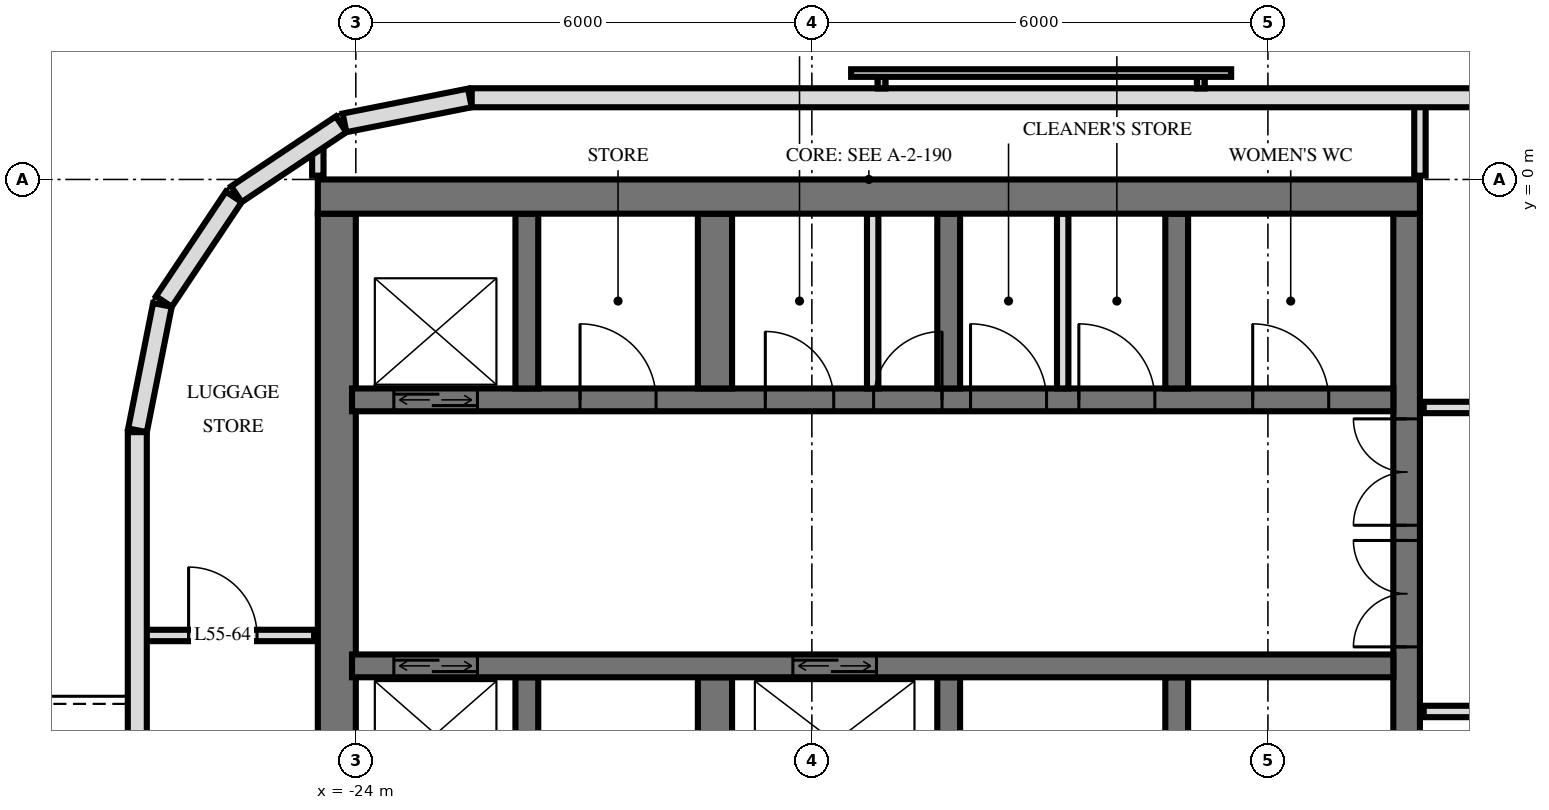
"""IFC4 building model, lengths in metres.
Left out: names, types, materials, properties, quantities, classifications, styles, units other than length and angle.
Written with IfcOpenShell. Run it as: python <this file> out.ifc"""

import sys

from ifc_helpers import new_model, si_unit, direction, frame, frame_2d, origin, place, context, subcontext, project, spatial, rectangle, extrude, element, fill, save


model = new_model("IFC4")
c1 = context("Model", 3, precision=1e-05, world=origin(), true_north=direction((0.0, 1.0)))
c2 = subcontext(c1, "Body", "Model", "MODEL_VIEW")
j1 = project(units=[si_unit("LENGTHUNIT", "METRE"), si_unit("PLANEANGLEUNIT", "RADIAN")], contexts=[c1])
p1 = place(None, origin())
s1 = spatial("IfcSite", under=j1, at=p1, CompositionType="ELEMENT")
p2 = place(p1, origin())
s2 = spatial("IfcBuilding", under=s1, at=p2, CompositionType="ELEMENT")
p3 = place(p2, frame((0.0, 0.0, 211.6)))
s3 = spatial("IfcBuildingStorey", under=s2, at=p3, CompositionType="ELEMENT", Elevation=211.6)
p4 = place(p3, frame((-24.5, -0.225, 0.0), z_axis=(0.0, 0.0, 1.0), x_axis=(1.0, 0.0, 0.0)))
e1 = element("IfcWall", 1, at=p4, inside=s3, PredefinedType="SHEAR", context=c2, shape_type="SweptSolid", body=[
    extrude(rectangle(XDim=14.5, YDim=0.45, at=frame_2d((7.25, 0.0))), origin(), (0.0, 0.0, 1.0), 3.5),
])
p5 = place(p3, frame((-10.175, -14.55, 0.0), z_axis=(0.0, 0.0, 1.0), x_axis=(0.0, 1.0, 0.0)))
e2 = element("IfcWall", 2, at=p5, inside=s3, PredefinedType="SHEAR", context=c2, shape_type="SweptSolid", body=[
    extrude(rectangle(XDim=14.1, YDim=0.35, at=frame_2d((7.05, 0.0))), origin(), (0.0, 0.0, 1.0), 3.5),
])
p6 = place(p5, frame((8.4, 0.0, 0.0)))
e3 = element("IfcOpeningElement", 3, at=p6, cuts=e2, PredefinedType="OPENING", context=c2, shape_type="SweptSolid", body=[
    extrude(rectangle(XDim=1.4, YDim=2.4, at=frame_2d((0.7, 1.2))), frame((0.0, 0.185, 0.0), z_axis=(0.0, -1.0, 0.0), x_axis=(1.0, 0.0, 0.0)), (0.0, 0.0, 1.0), 0.37),
])
p7 = place(p5, frame((10.0, 0.0, 0.0)))
e4 = element("IfcOpeningElement", 4, at=p7, cuts=e2, PredefinedType="OPENING", context=c2, shape_type="SweptSolid", body=[
    extrude(rectangle(XDim=1.4, YDim=2.4, at=frame_2d((0.7, 1.2))), frame((0.0, 0.185, 0.0), z_axis=(0.0, -1.0, 0.0), x_axis=(1.0, 0.0, 0.0)), (0.0, 0.0, 1.0), 0.37),
])
p8 = place(p5, frame((4.0, 0.0, 0.0)))
e5 = element("IfcOpeningElement", 5, at=p8, cuts=e2, PredefinedType="OPENING", context=c2, shape_type="SweptSolid", body=[
    extrude(rectangle(XDim=1.2, YDim=2.1, at=frame_2d((0.6, 1.05))), frame((0.0, 0.185, 0.0), z_axis=(0.0, -1.0, 0.0), x_axis=(1.0, 0.0, 0.0)), (0.0, 0.0, 1.0), 0.37),
])
p9 = place(p3, frame((-24.25, -14.55, 0.0), z_axis=(0.0, 0.0, 1.0), x_axis=(0.0, 1.0, 0.0)))
e6 = element("IfcWall", 6, at=p9, inside=s3, PredefinedType="SHEAR", context=c2, shape_type="SweptSolid", body=[
    extrude(rectangle(XDim=14.1, YDim=0.5, at=frame_2d((7.05, 0.0))), origin(), (0.0, 0.0, 1.0), 3.5),
])
p10 = place(p3, frame((-24.05, -2.9, 0.0), z_axis=(0.0, 0.0, 1.0), x_axis=(1.0, 0.0, 0.0)))
e7 = element("IfcWall", 7, at=p10, inside=s3, PredefinedType="SHEAR", context=c2, shape_type="SweptSolid", body=[
    extrude(rectangle(XDim=13.7, YDim=0.3, at=frame_2d((6.85, 0.0))), origin(), (0.0, 0.0, 1.0), 3.5),
])
p11 = place(p10, frame((0.55, 0.0, 0.0)))
e8 = element("IfcOpeningElement", 8, at=p11, cuts=e7, PredefinedType="OPENING", context=c2, shape_type="SweptSolid", body=[
    extrude(rectangle(XDim=1.1, YDim=2.1, at=frame_2d((0.55, 1.05))), frame((0.0, 0.16, 0.0), z_axis=(0.0, -1.0, 0.0), x_axis=(1.0, 0.0, 0.0)), (0.0, 0.0, 1.0), 0.32),
])
p12 = place(p10, frame((6.863, 0.0, 0.0)))
e9 = element("IfcOpeningElement", 9, at=p12, cuts=e7, PredefinedType="OPENING", context=c2, shape_type="SweptSolid", body=[
    extrude(rectangle(XDim=0.9, YDim=2.1, at=frame_2d((0.45, 1.05))), frame((0.0, 0.16, 0.0), z_axis=(0.0, -1.0, 0.0), x_axis=(1.0, 0.0, 0.0)), (0.0, 0.0, 1.0), 0.32),
])
p13 = place(p10, frame((5.438, 0.0, 0.0)))
e10 = element("IfcOpeningElement", 10, at=p13, cuts=e7, PredefinedType="OPENING", context=c2, shape_type="SweptSolid", body=[
    extrude(rectangle(XDim=0.9, YDim=2.1, at=frame_2d((0.45, 1.05))), frame((0.0, 0.16, 0.0), z_axis=(0.0, -1.0, 0.0), x_axis=(1.0, 0.0, 0.0)), (0.0, 0.0, 1.0), 0.32),
])
p14 = place(p10, frame((11.85, 0.0, 0.0)))
e11 = element("IfcOpeningElement", 11, at=p14, cuts=e7, PredefinedType="OPENING", context=c2, shape_type="SweptSolid", body=[
    extrude(rectangle(XDim=1.0, YDim=2.1, at=frame_2d((0.5, 1.05))), frame((0.0, 0.16, 0.0), z_axis=(0.0, -1.0, 0.0), x_axis=(1.0, 0.0, 0.0)), (0.0, 0.0, 1.0), 0.32),
])
p15 = place(p10, frame((9.562, 0.0, 0.0)))
e12 = element("IfcOpeningElement", 12, at=p15, cuts=e7, PredefinedType="OPENING", context=c2, shape_type="SweptSolid", body=[
    extrude(rectangle(XDim=1.0, YDim=2.1, at=frame_2d((0.5, 1.05))), frame((0.0, 0.16, 0.0), z_axis=(0.0, -1.0, 0.0), x_axis=(1.0, 0.0, 0.0)), (0.0, 0.0, 1.0), 0.32),
])
p16 = place(p10, frame((8.137, 0.0, 0.0)))
e13 = element("IfcOpeningElement", 13, at=p16, cuts=e7, PredefinedType="OPENING", context=c2, shape_type="SweptSolid", body=[
    extrude(rectangle(XDim=1.0, YDim=2.1, at=frame_2d((0.5, 1.05))), frame((0.0, 0.16, 0.0), z_axis=(0.0, -1.0, 0.0), x_axis=(1.0, 0.0, 0.0)), (0.0, 0.0, 1.0), 0.32),
])
p17 = place(p10, frame((3.0, 0.0, 0.0)))
e14 = element("IfcOpeningElement", 14, at=p17, cuts=e7, PredefinedType="OPENING", context=c2, shape_type="SweptSolid", body=[
    extrude(rectangle(XDim=1.0, YDim=2.1, at=frame_2d((0.5, 1.05))), frame((0.0, 0.16, 0.0), z_axis=(0.0, -1.0, 0.0), x_axis=(1.0, 0.0, 0.0)), (0.0, 0.0, 1.0), 0.32),
])
p18 = place(p3, frame((-24.05, -6.4, 0.0), z_axis=(0.0, 0.0, 1.0), x_axis=(1.0, 0.0, 0.0)))
e15 = element("IfcWall", 15, at=p18, inside=s3, PredefinedType="SHEAR", context=c2, shape_type="SweptSolid", body=[
    extrude(rectangle(XDim=13.7, YDim=0.3, at=frame_2d((6.85, 0.0))), origin(), (0.0, 0.0, 1.0), 3.5),
])
p19 = place(p18, frame((0.55, 0.0, 0.0)))
e16 = element("IfcOpeningElement", 16, at=p19, cuts=e15, PredefinedType="OPENING", context=c2, shape_type="SweptSolid", body=[
    extrude(rectangle(XDim=1.1, YDim=2.1, at=frame_2d((0.55, 1.05))), frame((0.0, 0.16, 0.0), z_axis=(0.0, -1.0, 0.0), x_axis=(1.0, 0.0, 0.0)), (0.0, 0.0, 1.0), 0.32),
])
p20 = place(p18, frame((5.8, 0.0, 0.0)))
e17 = element("IfcOpeningElement", 17, at=p20, cuts=e15, PredefinedType="OPENING", context=c2, shape_type="SweptSolid", body=[
    extrude(rectangle(XDim=1.1, YDim=2.1, at=frame_2d((0.55, 1.05))), frame((0.0, 0.16, 0.0), z_axis=(0.0, -1.0, 0.0), x_axis=(1.0, 0.0, 0.0)), (0.0, 0.0, 1.0), 0.32),
])
for number, where, z_axis, x_axis in (
    (18, (-13.2, -2.75, 0.0), (0.0, 0.0, 1.0), (0.0, 1.0, 0.0)),
    (19, (-13.2, -8.85, 0.0), (0.0, 0.0, 1.0), (0.0, 1.0, 0.0)),
    (20, (-16.2, -2.75, 0.0), (0.0, 0.0, 1.0), (0.0, 1.0, 0.0)),
    (21, (-16.2, -8.85, 0.0), (0.0, 0.0, 1.0), (0.0, 1.0, 0.0)),
):
    element("IfcWall", number, at=place(p3, frame(where, z_axis=z_axis, x_axis=x_axis)), inside=s3, PredefinedType="SHEAR", context=c2, shape_type="SweptSolid", body=[
        extrude(rectangle(XDim=2.3, YDim=0.3, at=frame_2d((1.15, 0.0))), origin(), (0.0, 0.0, 1.0), 3.5),
    ])
for number, where, z_axis, x_axis in (
    (22, (-19.275, -2.75, 0.0), (0.0, 0.0, 1.0), (0.0, 1.0, 0.0)),
    (23, (-19.275, -8.85, 0.0), (0.0, 0.0, 1.0), (0.0, 1.0, 0.0)),
):
    element("IfcWall", number, at=place(p3, frame(where, z_axis=z_axis, x_axis=x_axis)), inside=s3, PredefinedType="SHEAR", context=c2, shape_type="SweptSolid", body=[
        extrude(rectangle(XDim=2.3, YDim=0.45, at=frame_2d((1.15, 0.0))), origin(), (0.0, 0.0, 1.0), 3.5),
    ])
for number, where, z_axis, x_axis in (
    (24, (-21.75, -2.75, 0.0), (0.0, 0.0, 1.0), (0.0, 1.0, 0.0)),
    (25, (-21.75, -8.85, 0.0), (0.0, 0.0, 1.0), (0.0, 1.0, 0.0)),
):
    element("IfcWall", number, at=place(p3, frame(where, z_axis=z_axis, x_axis=x_axis)), inside=s3, PredefinedType="SHEAR", context=c2, shape_type="SweptSolid", body=[
        extrude(rectangle(XDim=2.3, YDim=0.3, at=frame_2d((1.15, 0.0))), origin(), (0.0, 0.0, 1.0), 3.5),
    ])
p21 = place(p3, frame((22.475, 1.075, 0.0), z_axis=(0.0, 0.0, 1.0), x_axis=(-1.0, 0.0, 0.0)))
e26 = element("IfcWall", 26, at=p21, inside=s3, PredefinedType="SOLIDWALL", context=c2, shape_type="SweptSolid", body=[
    extrude(rectangle(XDim=44.951, YDim=0.25, at=frame_2d((22.475, 0.0))), origin(), (0.0, 0.0, 1.0), 3.22),
])
p22 = place(p21, frame((18.275, 0.0, 0.9)))
e27 = element("IfcOpeningElement", 27, at=p22, cuts=e26, PredefinedType="OPENING", context=c2, shape_type="SweptSolid", body=[
    extrude(rectangle(XDim=2.4, YDim=1.5, at=frame_2d((1.2, 0.75))), frame((0.0, 0.135, 0.0), z_axis=(0.0, -1.0, 0.0), x_axis=(1.0, 0.0, 0.0)), (0.0, 0.0, 1.0), 0.27),
])
p23 = place(p21, frame((24.275, 0.0, 0.9)))
e28 = element("IfcOpeningElement", 28, at=p23, cuts=e26, PredefinedType="OPENING", context=c2, shape_type="SweptSolid", body=[
    extrude(rectangle(XDim=2.4, YDim=1.5, at=frame_2d((1.2, 0.75))), frame((0.0, 0.135, 0.0), z_axis=(0.0, -1.0, 0.0), x_axis=(1.0, 0.0, 0.0)), (0.0, 0.0, 1.0), 0.27),
])
p24 = place(p21, frame((27.275, 0.0, 0.9)))
e29 = element("IfcOpeningElement", 29, at=p24, cuts=e26, PredefinedType="OPENING", context=c2, shape_type="SweptSolid", body=[
    extrude(rectangle(XDim=2.4, YDim=1.5, at=frame_2d((1.2, 0.75))), frame((0.0, 0.135, 0.0), z_axis=(0.0, -1.0, 0.0), x_axis=(1.0, 0.0, 0.0)), (0.0, 0.0, 1.0), 0.27),
])
p25 = place(p3, frame((-22.5, 1.073, 0.0), z_axis=(0.0, 0.0, 1.0), x_axis=(-0.980803419081, -0.194999110559, 0.0)))
e30 = element("IfcWall", 30, at=p25, inside=s3, PredefinedType="SOLIDWALL", context=c2, shape_type="SweptSolid", body=[
    extrude(rectangle(XDim=1.681, YDim=0.25, at=frame_2d((0.841, 0.0))), origin(), (0.0, 0.0, 1.0), 3.22),
])
for number, where, z_axis, x_axis in (
    (31, (-24.194, 0.726, 0.0), (0.0, 0.0, 1.0), (-0.831, -0.556, 0.0)),
    (32, (-25.606, -0.229, 0.0), (0.0, 0.0, 1.0), (-0.556, -0.831, 0.0)),
):
    element("IfcWall", number, at=place(p3, frame(where, z_axis=z_axis, x_axis=x_axis)), inside=s3, PredefinedType="SOLIDWALL", context=c2, shape_type="SweptSolid", body=[
        extrude(rectangle(XDim=1.656, YDim=0.25, at=frame_2d((0.828, 0.0))), origin(), (0.0, 0.0, 1.0), 3.22),
    ])
p26 = place(p3, frame((-26.545, -1.651, 0.0), z_axis=(0.0, 0.0, 1.0), x_axis=(-0.194999110559, -0.980803419081, 0.0)))
e33 = element("IfcWall", 33, at=p26, inside=s3, PredefinedType="SOLIDWALL", context=c2, shape_type="SweptSolid", body=[
    extrude(rectangle(XDim=1.681, YDim=0.25, at=frame_2d((0.841, 0.0))), origin(), (0.0, 0.0, 1.0), 3.22),
])
p27 = place(p3, frame((-26.875, -3.325, 0.0), z_axis=(0.0, 0.0, 1.0), x_axis=(0.0, -1.0, 0.0)))
e34 = element("IfcWall", 34, at=p27, inside=s3, PredefinedType="SOLIDWALL", context=c2, shape_type="SweptSolid", body=[
    extrude(rectangle(XDim=21.551, YDim=0.25, at=frame_2d((10.775, 0.0))), origin(), (0.0, 0.0, 1.0), 3.22),
])
p28 = place(p27, frame((6.65, 0.0, 0.0)))
e35 = element("IfcOpeningElement", 35, at=p28, cuts=e34, PredefinedType="OPENING", context=c2, shape_type="SweptSolid", body=[
    extrude(rectangle(XDim=1.8, YDim=2.4, at=frame_2d((0.9, 1.2))), frame((0.0, 0.135, 0.0), z_axis=(0.0, -1.0, 0.0), x_axis=(1.0, 0.0, 0.0)), (0.0, 0.0, 1.0), 0.27),
])
p29 = place(p27, frame((12.275, 0.0, 0.9)))
e36 = element("IfcOpeningElement", 36, at=p29, cuts=e34, PredefinedType="OPENING", context=c2, shape_type="SweptSolid", body=[
    extrude(rectangle(XDim=1.2, YDim=1.5, at=frame_2d((0.6, 0.75))), frame((0.0, 0.135, 0.0), z_axis=(0.0, -1.0, 0.0), x_axis=(1.0, 0.0, 0.0)), (0.0, 0.0, 1.0), 0.27),
])
p30 = place(p27, frame((14.675, 0.0, 0.0)))
e37 = element("IfcOpeningElement", 37, at=p30, cuts=e34, PredefinedType="OPENING", context=c2, shape_type="SweptSolid", body=[
    extrude(rectangle(XDim=1.8, YDim=2.4, at=frame_2d((0.9, 1.2))), frame((0.0, 0.135, 0.0), z_axis=(0.0, -1.0, 0.0), x_axis=(1.0, 0.0, 0.0)), (0.0, 0.0, 1.0), 0.27),
])
p31 = place(p27, frame((18.875, 0.0, 0.0)))
e38 = element("IfcOpeningElement", 38, at=p31, cuts=e34, PredefinedType="OPENING", context=c2, shape_type="SweptSolid", body=[
    extrude(rectangle(XDim=1.8, YDim=2.4, at=frame_2d((0.9, 1.2))), frame((0.0, 0.135, 0.0), z_axis=(0.0, -1.0, 0.0), x_axis=(1.0, 0.0, 0.0)), (0.0, 0.0, 1.0), 0.27),
])
for number, where, z_axis, x_axis in (
    (39, (-17.2, -2.75, 0.0), (0.0, 0.0, 1.0), (0.0, 1.0, 0.0)),
    (40, (-14.7, -2.75, 0.0), (0.0, 0.0, 1.0), (0.0, 1.0, 0.0)),
):
    element("IfcWall", number, at=place(p3, frame(where, z_axis=z_axis, x_axis=x_axis)), inside=s3, PredefinedType="PARTITIONING", context=c2, shape_type="SweptSolid", body=[
        extrude(rectangle(XDim=2.3, YDim=0.15, at=frame_2d((1.15, 0.0))), origin(), (0.0, 0.0, 1.0), 3.2),
    ])
p32 = place(p3, frame((-10.0, 0.05, 0.0), z_axis=(0.0, 0.0, 1.0), x_axis=(0.0, 1.0, 0.0)))
e41 = element("IfcWall", 41, at=p32, inside=s3, PredefinedType="PARTITIONING", context=c2, shape_type="SweptSolid", body=[
    extrude(rectangle(XDim=0.97, YDim=0.15, at=frame_2d((0.485, 0.0))), origin(), (0.0, 0.0, 1.0), 3.22),
])
p33 = place(p3, frame((-24.5, 0.05, 0.0), z_axis=(0.0, 0.0, 1.0), x_axis=(0.0, 1.0, 0.0)))
e42 = element("IfcWall", 42, at=p33, inside=s3, PredefinedType="PARTITIONING", context=c2, shape_type="SweptSolid", body=[
    extrude(rectangle(XDim=0.405, YDim=0.15, at=frame_2d((0.203, 0.0))), origin(), (0.0, 0.0, 1.0), 3.22),
])
p34 = place(p3, frame((-9.95, -7.0, 0.0), z_axis=(0.0, 0.0, 1.0), x_axis=(1.0, 0.0, 0.0)))
e43 = element("IfcWall", 43, at=p34, inside=s3, PredefinedType="PARTITIONING", context=c2, shape_type="SweptSolid", body=[
    extrude(rectangle(XDim=19.9, YDim=0.15, at=frame_2d((9.95, 0.0))), origin(), (0.0, 0.0, 1.0), 3.22),
])
p35 = place(p34, frame((9.45, 0.0, 0.0)))
e44 = element("IfcOpeningElement", 44, at=p35, cuts=e43, PredefinedType="OPENING", context=c2, shape_type="SweptSolid", body=[
    extrude(rectangle(XDim=1.0, YDim=2.1, at=frame_2d((0.5, 1.05))), frame((0.0, 0.085, 0.0), z_axis=(0.0, -1.0, 0.0), x_axis=(1.0, 0.0, 0.0)), (0.0, 0.0, 1.0), 0.17),
])
p36 = place(p34, frame((3.45, 0.0, 0.0)))
e45 = element("IfcOpeningElement", 45, at=p36, cuts=e43, PredefinedType="OPENING", context=c2, shape_type="SweptSolid", body=[
    extrude(rectangle(XDim=1.0, YDim=2.1, at=frame_2d((0.5, 1.05))), frame((0.0, 0.085, 0.0), z_axis=(0.0, -1.0, 0.0), x_axis=(1.0, 0.0, 0.0)), (0.0, 0.0, 1.0), 0.17),
])
p37 = place(p3, frame((-26.82, -6.0, 0.0), z_axis=(0.0, 0.0, 1.0), x_axis=(1.0, 0.0, 0.0)))
e46 = element("IfcWall", 46, at=p37, inside=s3, PredefinedType="PARTITIONING", context=c2, shape_type="SweptSolid", body=[
    extrude(rectangle(XDim=2.27, YDim=0.15, at=frame_2d((1.135, 0.0))), origin(), (0.0, 0.0, 1.0), 3.22),
])
p38 = place(p37, frame((0.62, 0.0, 0.0)))
e47 = element("IfcOpeningElement", 47, at=p38, cuts=e46, PredefinedType="OPENING", context=c2, shape_type="SweptSolid", body=[
    extrude(rectangle(XDim=0.9, YDim=2.1, at=frame_2d((0.45, 1.05))), frame((0.0, 0.085, 0.0), z_axis=(0.0, -1.0, 0.0), x_axis=(1.0, 0.0, 0.0)), (0.0, 0.0, 1.0), 0.17),
])
p39 = place(p3, frame((-9.95, -3.0, 0.0), z_axis=(0.0, 0.0, 1.0), x_axis=(1.0, 0.0, 0.0)))
e48 = element("IfcWall", 48, at=p39, inside=s3, PredefinedType="PARTITIONING", context=c2, shape_type="SweptSolid", body=[
    extrude(rectangle(XDim=19.9, YDim=0.15, at=frame_2d((9.95, 0.0))), origin(), (0.0, 0.0, 1.0), 3.22),
])
p40 = place(p39, frame((4.2, 0.0, 0.0)))
e49 = element("IfcOpeningElement", 49, at=p40, cuts=e48, PredefinedType="OPENING", context=c2, shape_type="SweptSolid", body=[
    extrude(rectangle(XDim=1.0, YDim=2.1, at=frame_2d((0.5, 1.05))), frame((0.0, 0.085, 0.0), z_axis=(0.0, -1.0, 0.0), x_axis=(1.0, 0.0, 0.0)), (0.0, 0.0, 1.0), 0.17),
])
p41 = place(p39, frame((11.45, 0.0, 0.0)))
e50 = element("IfcOpeningElement", 50, at=p41, cuts=e48, PredefinedType="OPENING", context=c2, shape_type="SweptSolid", body=[
    extrude(rectangle(XDim=1.0, YDim=2.1, at=frame_2d((0.5, 1.05))), frame((0.0, 0.085, 0.0), z_axis=(0.0, -1.0, 0.0), x_axis=(1.0, 0.0, 0.0)), (0.0, 0.0, 1.0), 0.17),
])
p42 = place(p39, frame((15.45, 0.0, 0.0)))
e51 = element("IfcOpeningElement", 51, at=p42, cuts=e48, PredefinedType="OPENING", context=c2, shape_type="SweptSolid", body=[
    extrude(rectangle(XDim=1.0, YDim=2.1, at=frame_2d((0.5, 1.05))), frame((0.0, 0.085, 0.0), z_axis=(0.0, -1.0, 0.0), x_axis=(1.0, 0.0, 0.0)), (0.0, 0.0, 1.0), 0.17),
])
p43 = place(p39, frame((18.2, 0.0, 0.0)))
e52 = element("IfcOpeningElement", 52, at=p43, cuts=e48, PredefinedType="OPENING", context=c2, shape_type="SweptSolid", body=[
    extrude(rectangle(XDim=1.0, YDim=2.1, at=frame_2d((0.5, 1.05))), frame((0.0, 0.085, 0.0), z_axis=(0.0, -1.0, 0.0), x_axis=(1.0, 0.0, 0.0)), (0.0, 0.0, 1.0), 0.17),
])
p44 = place(p11, origin())
e53 = element("IfcDoor", 53, at=p44, inside=s3, OperationType="DOUBLE_DOOR_SLIDING", PredefinedType="USERDEFINED", context=c2, shape_type="SweptSolid", body=[
    extrude(rectangle(XDim=1.1, YDim=2.1, at=frame_2d((0.55, 1.05))), frame((0.0, 0.025, 0.0), z_axis=(0.0, -1.0, 0.0), x_axis=(1.0, 0.0, 0.0)), (0.0, 0.0, 1.0), 0.05),
])
fill(e8, e53)
p45 = place(p19, origin())
e54 = element("IfcDoor", 54, at=p45, inside=s3, OperationType="DOUBLE_DOOR_SLIDING", PredefinedType="USERDEFINED", context=c2, shape_type="SweptSolid", body=[
    extrude(rectangle(XDim=1.1, YDim=2.1, at=frame_2d((0.55, 1.05))), frame((0.0, 0.025, 0.0), z_axis=(0.0, -1.0, 0.0), x_axis=(1.0, 0.0, 0.0)), (0.0, 0.0, 1.0), 0.05),
])
fill(e16, e54)
p46 = place(p20, origin())
e55 = element("IfcDoor", 55, at=p46, inside=s3, OperationType="DOUBLE_DOOR_SLIDING", PredefinedType="USERDEFINED", context=c2, shape_type="SweptSolid", body=[
    extrude(rectangle(XDim=1.1, YDim=2.1, at=frame_2d((0.55, 1.05))), frame((0.0, 0.025, 0.0), z_axis=(0.0, -1.0, 0.0), x_axis=(1.0, 0.0, 0.0)), (0.0, 0.0, 1.0), 0.05),
])
fill(e17, e55)
p47 = place(p6, origin())
e56 = element("IfcDoor", 56, at=p47, inside=s3, OperationType="DOUBLE_DOOR_SINGLE_SWING", PredefinedType="DOOR", context=c2, shape_type="SweptSolid", body=[
    extrude(rectangle(XDim=1.4, YDim=2.4, at=frame_2d((0.7, 1.2))), frame((0.0, 0.025, 0.0), z_axis=(0.0, -1.0, 0.0), x_axis=(1.0, 0.0, 0.0)), (0.0, 0.0, 1.0), 0.05),
])
fill(e3, e56)
p48 = place(p7, origin())
e57 = element("IfcDoor", 57, at=p48, inside=s3, OperationType="DOUBLE_DOOR_SINGLE_SWING", PredefinedType="DOOR", context=c2, shape_type="SweptSolid", body=[
    extrude(rectangle(XDim=1.4, YDim=2.4, at=frame_2d((0.7, 1.2))), frame((0.0, 0.025, 0.0), z_axis=(0.0, -1.0, 0.0), x_axis=(1.0, 0.0, 0.0)), (0.0, 0.0, 1.0), 0.05),
])
fill(e4, e57)
p49 = place(p12, origin())
e58 = element("IfcDoor", 58, at=p49, inside=s3, OperationType="SINGLE_SWING_LEFT", PredefinedType="DOOR", context=c2, shape_type="SweptSolid", body=[
    extrude(rectangle(XDim=0.9, YDim=2.1, at=frame_2d((0.45, 1.05))), frame((0.0, 0.025, 0.0), z_axis=(0.0, -1.0, 0.0), x_axis=(1.0, 0.0, 0.0)), (0.0, 0.0, 1.0), 0.05),
])
fill(e9, e58)
p50 = place(p13, origin())
e59 = element("IfcDoor", 59, at=p50, inside=s3, OperationType="SINGLE_SWING_RIGHT", PredefinedType="DOOR", context=c2, shape_type="SweptSolid", body=[
    extrude(rectangle(XDim=0.9, YDim=2.1, at=frame_2d((0.45, 1.05))), frame((0.0, 0.025, 0.0), z_axis=(0.0, -1.0, 0.0), x_axis=(1.0, 0.0, 0.0)), (0.0, 0.0, 1.0), 0.05),
])
fill(e10, e59)
p51 = place(p14, origin())
e60 = element("IfcDoor", 60, at=p51, inside=s3, OperationType="SINGLE_SWING_RIGHT", PredefinedType="DOOR", context=c2, shape_type="SweptSolid", body=[
    extrude(rectangle(XDim=1.0, YDim=2.1, at=frame_2d((0.5, 1.05))), frame((0.0, 0.025, 0.0), z_axis=(0.0, -1.0, 0.0), x_axis=(1.0, 0.0, 0.0)), (0.0, 0.0, 1.0), 0.05),
])
fill(e11, e60)
p52 = place(p15, origin())
e61 = element("IfcDoor", 61, at=p52, inside=s3, OperationType="SINGLE_SWING_RIGHT", PredefinedType="DOOR", context=c2, shape_type="SweptSolid", body=[
    extrude(rectangle(XDim=1.0, YDim=2.1, at=frame_2d((0.5, 1.05))), frame((0.0, 0.025, 0.0), z_axis=(0.0, -1.0, 0.0), x_axis=(1.0, 0.0, 0.0)), (0.0, 0.0, 1.0), 0.05),
])
fill(e12, e61)
p53 = place(p16, origin())
e62 = element("IfcDoor", 62, at=p53, inside=s3, OperationType="SINGLE_SWING_RIGHT", PredefinedType="DOOR", context=c2, shape_type="SweptSolid", body=[
    extrude(rectangle(XDim=1.0, YDim=2.1, at=frame_2d((0.5, 1.05))), frame((0.0, 0.025, 0.0), z_axis=(0.0, -1.0, 0.0), x_axis=(1.0, 0.0, 0.0)), (0.0, 0.0, 1.0), 0.05),
])
fill(e13, e62)
p54 = place(p17, origin())
e63 = element("IfcDoor", 63, at=p54, inside=s3, OperationType="SINGLE_SWING_RIGHT", PredefinedType="DOOR", context=c2, shape_type="SweptSolid", body=[
    extrude(rectangle(XDim=1.0, YDim=2.1, at=frame_2d((0.5, 1.05))), frame((0.0, 0.025, 0.0), z_axis=(0.0, -1.0, 0.0), x_axis=(1.0, 0.0, 0.0)), (0.0, 0.0, 1.0), 0.05),
])
fill(e14, e63)
p55 = place(p38, origin())
e64 = element("IfcDoor", 64, at=p55, inside=s3, OperationType="SINGLE_SWING_RIGHT", PredefinedType="DOOR", context=c2, shape_type="SweptSolid", body=[
    extrude(rectangle(XDim=0.9, YDim=2.1, at=frame_2d((0.45, 1.05))), frame((0.0, 0.025, 0.0), z_axis=(0.0, -1.0, 0.0), x_axis=(1.0, 0.0, 0.0)), (0.0, 0.0, 1.0), 0.05),
])
fill(e47, e64)
save(model, sys.argv[1])
